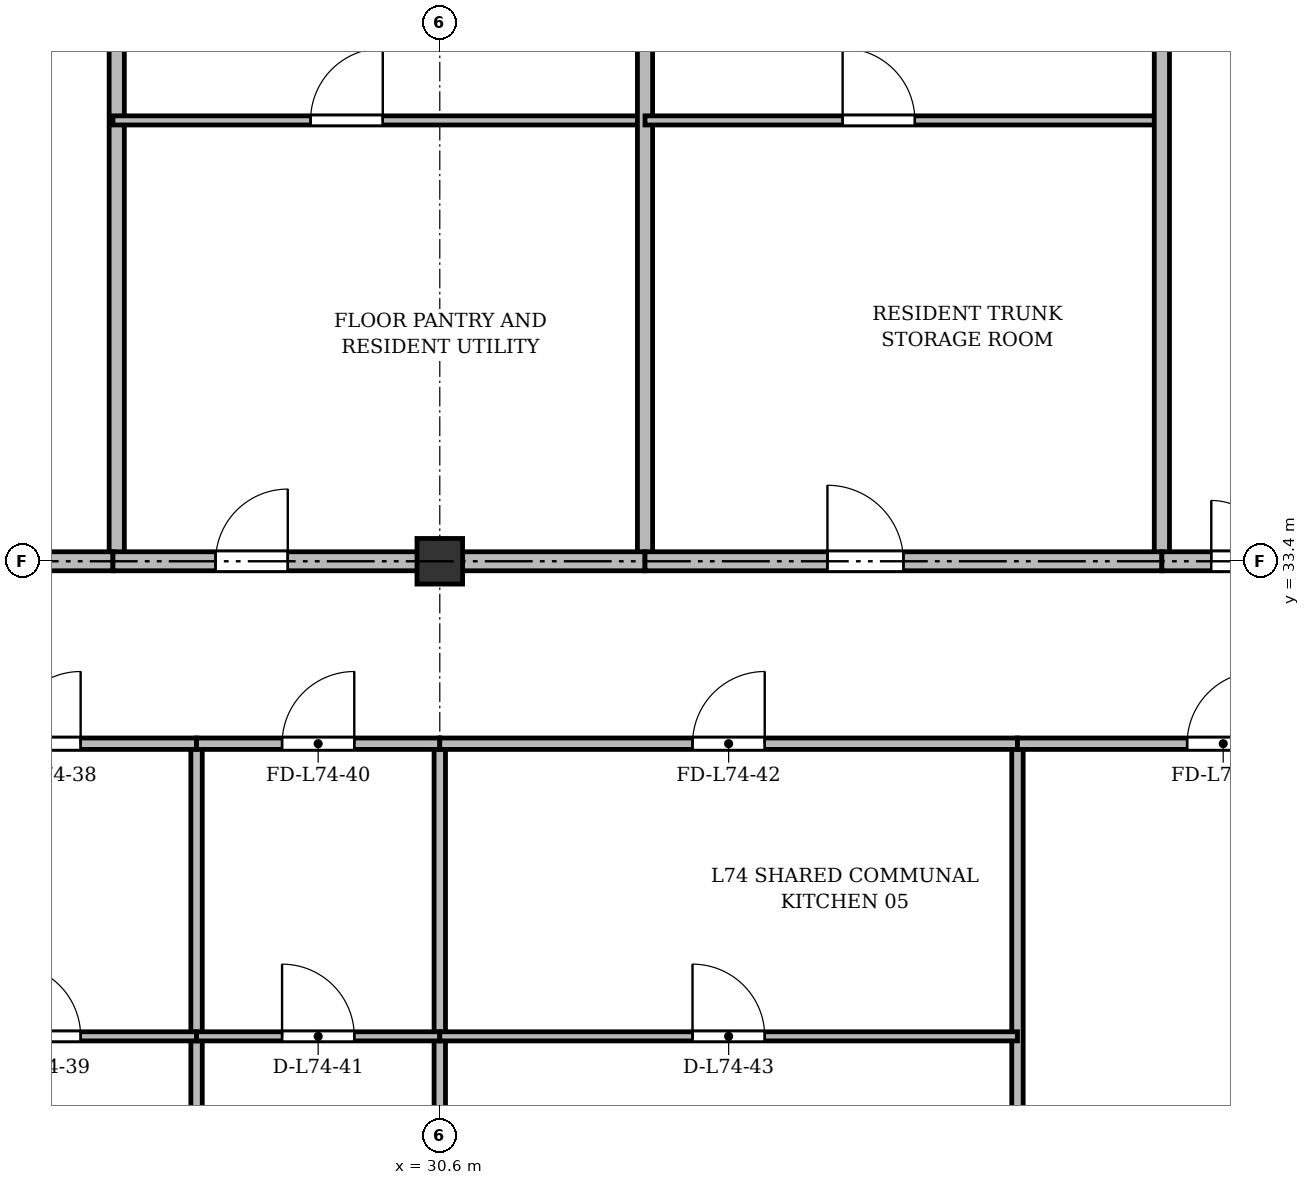
"""IFC4 building model, lengths in metres.
Left out: names, types, materials, properties, quantities, classifications, styles, units other than length and angle.
Written with IfcOpenShell. Run it as: python <this file> out.ifc"""

import sys

from ifc_helpers import new_model, si_unit, direction, frame, frame_2d, origin, origin_2d, place, context, subcontext, project, spatial, rectangle, extrude, source, transform, mapped, element, fill, save


model = new_model("IFC4")
c1 = context("Model", 3, precision=1e-05, world=origin(), true_north=direction((0.0, 1.0)))
c2 = subcontext(c1, "Body", "Model", "MODEL_VIEW")
j1 = project(units=[si_unit("LENGTHUNIT", "METRE"), si_unit("PLANEANGLEUNIT", "RADIAN")], contexts=[c1])
p1 = place(None, origin())
s1 = spatial("IfcSite", under=j1, at=p1, CompositionType="ELEMENT")
p2 = place(p1, origin())
s2 = spatial("IfcBuilding", under=s1, at=p2, CompositionType="ELEMENT")
p3 = place(p2, frame((0.0, 0.0, 284.7)))
s3 = spatial("IfcBuildingStorey", under=s2, at=p3, CompositionType="ELEMENT", Elevation=284.7)
m1 = source(origin(), c2, "Body", "SweptSolid", [
    extrude(rectangle(XDim=0.6, YDim=0.6, at=origin_2d()), origin(), (0.0, 0.0, 1.0), 3.6),
])
p4 = place(p3, frame((30.6, 33.4, 0.0), z_axis=(0.0, 0.0, 1.0), x_axis=(1.0, 0.0, 0.0)))
e1 = element("IfcColumn", 1, at=p4, inside=s3, PredefinedType="COLUMN", context=c2, shape_type="MappedRepresentation", body=[
    mapped(m1, transform((0.0, 0.0, 0.0), x_axis=(1.0, 0.0, 0.0), y_axis=(0.0, 1.0, 0.0), z_axis=(0.0, 0.0, 1.0), scale=1.0)),
])
p5 = place(p3, frame((26.35, 33.4, 0.0), z_axis=(0.0, 0.0, 1.0), x_axis=(0.0, 1.0, 0.0)))
e2 = element("IfcWall", 2, at=p5, inside=s3, PredefinedType="SOLIDWALL", context=c2, shape_type="SweptSolid", body=[
    extrude(rectangle(XDim=11.3, YDim=0.2, at=frame_2d((5.65, 0.0))), origin(), (0.0, 0.0, 1.0), 2.92),
])
p6 = place(p3, frame((19.5, 33.4, 0.0), z_axis=(0.0, 0.0, 1.0), x_axis=(1.0, 0.0, 0.0)))
e3 = element("IfcWall", 3, at=p6, inside=s3, PredefinedType="PARTITIONING", context=c2, shape_type="SweptSolid", body=[
    extrude(rectangle(XDim=6.8, YDim=0.25, at=frame_2d((3.4, 0.0))), origin(), (0.0, 0.0, 1.0), 2.92),
])
p7 = place(p6, frame((0.75, 0.0, 0.0)))
e4 = element("IfcOpeningElement", 4, at=p7, cuts=e3, PredefinedType="OPENING", context=c2, shape_type="SweptSolid", body=[
    extrude(rectangle(XDim=1.6, YDim=2.2, at=frame_2d((0.8, 1.1))), frame((0.0, 0.135, 0.0), z_axis=(0.0, -1.0, 0.0), x_axis=(1.0, 0.0, 0.0)), (0.0, 0.0, 1.0), 0.27),
])
p8 = place(p3, frame((26.3, 39.2, 0.0), z_axis=(0.0, 0.0, 1.0), x_axis=(1.0, 0.0, 0.0)))
e5 = element("IfcWall", 5, at=p8, inside=s3, PredefinedType="PARTITIONING", context=c2, shape_type="SweptSolid", body=[
    extrude(rectangle(XDim=7.0, YDim=0.12, at=frame_2d((3.5, 0.0))), origin(), (0.0, 0.0, 1.0), 2.87),
])
p9 = place(p8, frame((2.6, 0.0, 0.0)))
e6 = element("IfcOpeningElement", 6, at=p9, cuts=e5, PredefinedType="OPENING", context=c2, shape_type="SweptSolid", body=[
    extrude(rectangle(XDim=0.95, YDim=2.15, at=frame_2d((0.475, 1.075))), frame((0.0, 0.07, 0.0), z_axis=(0.0, -1.0, 0.0), x_axis=(1.0, 0.0, 0.0)), (0.0, 0.0, 1.0), 0.14),
])
p10 = place(p3, frame((33.3, 33.4, 0.0), z_axis=(0.0, 0.0, 1.0), x_axis=(0.0, 1.0, 0.0)))
e7 = element("IfcWall", 7, at=p10, inside=s3, PredefinedType="SOLIDWALL", context=c2, shape_type="SweptSolid", body=[
    extrude(rectangle(XDim=11.3, YDim=0.2, at=frame_2d((5.65, 0.0))), origin(), (0.0, 0.0, 1.0), 2.92),
])
p11 = place(p3, frame((33.3, 39.2, 0.0), z_axis=(0.0, 0.0, 1.0), x_axis=(1.0, 0.0, 0.0)))
e8 = element("IfcWall", 8, at=p11, inside=s3, PredefinedType="PARTITIONING", context=c2, shape_type="SweptSolid", body=[
    extrude(rectangle(XDim=6.8, YDim=0.12, at=frame_2d((3.4, 0.0))), origin(), (0.0, 0.0, 1.0), 3.37),
])
p12 = place(p11, frame((2.6, 0.0, 0.0)))
e9 = element("IfcOpeningElement", 9, at=p12, cuts=e8, PredefinedType="OPENING", context=c2, shape_type="SweptSolid", body=[
    extrude(rectangle(XDim=0.95, YDim=2.15, at=frame_2d((0.475, 1.075))), frame((0.0, 0.07, 0.0), z_axis=(0.0, -1.0, 0.0), x_axis=(1.0, 0.0, 0.0)), (0.0, 0.0, 1.0), 0.14),
])
p13 = place(p3, frame((40.1, 33.4, 0.0), z_axis=(0.0, 0.0, 1.0), x_axis=(0.0, 1.0, 0.0)))
e10 = element("IfcWall", 10, at=p13, inside=s3, PredefinedType="SOLIDWALL", context=c2, shape_type="SweptSolid", body=[
    extrude(rectangle(XDim=8.0, YDim=0.2, at=frame_2d((4.0, 0.0))), origin(), (0.0, 0.0, 1.0), 2.92),
])
p14 = place(p3, frame((26.3, 33.4, 0.0), z_axis=(0.0, 0.0, 1.0), x_axis=(1.0, 0.0, 0.0)))
e11 = element("IfcWall", 11, at=p14, inside=s3, PredefinedType="PARTITIONING", context=c2, shape_type="SweptSolid", body=[
    extrude(rectangle(XDim=7.0, YDim=0.25, at=frame_2d((3.5, 0.0))), origin(), (0.0, 0.0, 1.0), 2.92),
])
p15 = place(p14, frame((1.35, 0.0, 0.0)))
e12 = element("IfcOpeningElement", 12, at=p15, cuts=e11, PredefinedType="OPENING", context=c2, shape_type="SweptSolid", body=[
    extrude(rectangle(XDim=0.95, YDim=2.15, at=frame_2d((0.475, 1.075))), frame((0.0, 0.135, 0.0), z_axis=(0.0, -1.0, 0.0), x_axis=(1.0, 0.0, 0.0)), (0.0, 0.0, 1.0), 0.27),
])
p16 = place(p3, frame((33.3, 33.4, 0.0), z_axis=(0.0, 0.0, 1.0), x_axis=(1.0, 0.0, 0.0)))
e13 = element("IfcWall", 13, at=p16, inside=s3, PredefinedType="PARTITIONING", context=c2, shape_type="SweptSolid", body=[
    extrude(rectangle(XDim=6.8, YDim=0.25, at=frame_2d((3.4, 0.0))), origin(), (0.0, 0.0, 1.0), 2.92),
])
p17 = place(p16, frame((2.4, 0.0, 0.0)))
e14 = element("IfcOpeningElement", 14, at=p17, cuts=e13, PredefinedType="OPENING", context=c2, shape_type="SweptSolid", body=[
    extrude(rectangle(XDim=1.0, YDim=2.15, at=frame_2d((0.5, 1.075))), frame((0.0, 0.135, 0.0), z_axis=(0.0, -1.0, 0.0), x_axis=(1.0, 0.0, 0.0)), (0.0, 0.0, 1.0), 0.27),
])
p18 = place(p3, frame((40.1, 33.4, 0.0), z_axis=(0.0, 0.0, 1.0), x_axis=(1.0, 0.0, 0.0)))
e15 = element("IfcWall", 15, at=p18, inside=s3, PredefinedType="PARTITIONING", context=c2, shape_type="SweptSolid", body=[
    extrude(rectangle(XDim=7.05, YDim=0.25, at=frame_2d((3.525, 0.0))), origin(), (0.0, 0.0, 1.0), 2.92),
])
p19 = place(p18, frame((0.65, 0.0, 0.0)))
e16 = element("IfcOpeningElement", 16, at=p19, cuts=e15, PredefinedType="OPENING", context=c2, shape_type="SweptSolid", body=[
    extrude(rectangle(XDim=1.6, YDim=2.2, at=frame_2d((0.8, 1.1))), frame((0.0, 0.135, 0.0), z_axis=(0.0, -1.0, 0.0), x_axis=(1.0, 0.0, 0.0)), (0.0, 0.0, 1.0), 0.27),
])
p20 = place(p3, frame((27.4, 3.725, 0.0), z_axis=(0.0, 0.0, 1.0), x_axis=(0.0, 1.0, 0.0)))
e17 = element("IfcWall", 17, at=p20, inside=s3, PredefinedType="PARTITIONING", context=c2, shape_type="SweptSolid", body=[
    extrude(rectangle(XDim=27.275, YDim=0.15, at=frame_2d((13.637, 0.0))), origin(), (0.0, 0.0, 1.0), 2.92),
])
p21 = place(p3, frame((30.6, 3.725, 0.0), z_axis=(0.0, 0.0, 1.0), x_axis=(0.0, 1.0, 0.0)))
e18 = element("IfcWall", 18, at=p21, inside=s3, PredefinedType="PARTITIONING", context=c2, shape_type="SweptSolid", body=[
    extrude(rectangle(XDim=27.275, YDim=0.15, at=frame_2d((13.637, 0.0))), origin(), (0.0, 0.0, 1.0), 2.87),
])
p22 = place(p3, frame((38.2, 3.725, 0.0), z_axis=(0.0, 0.0, 1.0), x_axis=(0.0, 1.0, 0.0)))
e19 = element("IfcWall", 19, at=p22, inside=s3, PredefinedType="PARTITIONING", context=c2, shape_type="SweptSolid", body=[
    extrude(rectangle(XDim=27.275, YDim=0.15, at=frame_2d((13.637, 0.0))), origin(), (0.0, 0.0, 1.0), 2.92),
])
p23 = place(p3, frame((23.4, 31.0, 0.0), z_axis=(0.0, 0.0, 1.0), x_axis=(1.0, 0.0, 0.0)))
e20 = element("IfcWall", 20, at=p23, inside=s3, PredefinedType="PARTITIONING", context=c2, shape_type="SweptSolid", body=[
    extrude(rectangle(XDim=4.0, YDim=0.15, at=frame_2d((2.0, 0.0))), origin(), (0.0, 0.0, 1.0), 2.87),
])
p24 = place(p23, frame((1.525, 0.0, 0.0)))
e21 = element("IfcOpeningElement", 21, at=p24, cuts=e20, PredefinedType="OPENING", context=c2, shape_type="SweptSolid", body=[
    extrude(rectangle(XDim=0.95, YDim=2.15, at=frame_2d((0.475, 1.075))), frame((0.0, 0.085, 0.0), z_axis=(0.0, -1.0, 0.0), x_axis=(1.0, 0.0, 0.0)), (0.0, 0.0, 1.0), 0.17),
])
p25 = place(p3, frame((23.4, 27.15, 0.0), z_axis=(0.0, 0.0, 1.0), x_axis=(1.0, 0.0, 0.0)))
e22 = element("IfcWall", 22, at=p25, inside=s3, PredefinedType="PARTITIONING", context=c2, shape_type="SweptSolid", body=[
    extrude(rectangle(XDim=4.0, YDim=0.12, at=frame_2d((2.0, 0.0))), origin(), (0.0, 0.0, 1.0), 2.87),
])
p26 = place(p25, frame((1.525, 0.0, 0.0)))
e23 = element("IfcOpeningElement", 23, at=p26, cuts=e22, PredefinedType="OPENING", context=c2, shape_type="SweptSolid", body=[
    extrude(rectangle(XDim=0.95, YDim=2.15, at=frame_2d((0.475, 1.075))), frame((0.0, 0.07, 0.0), z_axis=(0.0, -1.0, 0.0), x_axis=(1.0, 0.0, 0.0)), (0.0, 0.0, 1.0), 0.14),
])
p27 = place(p3, frame((27.4, 31.0, 0.0), z_axis=(0.0, 0.0, 1.0), x_axis=(1.0, 0.0, 0.0)))
e24 = element("IfcWall", 24, at=p27, inside=s3, PredefinedType="PARTITIONING", context=c2, shape_type="SweptSolid", body=[
    extrude(rectangle(XDim=3.2, YDim=0.15, at=frame_2d((1.6, 0.0))), origin(), (0.0, 0.0, 1.0), 2.87),
])
p28 = place(p27, frame((1.125, 0.0, 0.0)))
e25 = element("IfcOpeningElement", 25, at=p28, cuts=e24, PredefinedType="OPENING", context=c2, shape_type="SweptSolid", body=[
    extrude(rectangle(XDim=0.95, YDim=2.15, at=frame_2d((0.475, 1.075))), frame((0.0, 0.085, 0.0), z_axis=(0.0, -1.0, 0.0), x_axis=(1.0, 0.0, 0.0)), (0.0, 0.0, 1.0), 0.17),
])
p29 = place(p3, frame((27.4, 27.15, 0.0), z_axis=(0.0, 0.0, 1.0), x_axis=(1.0, 0.0, 0.0)))
e26 = element("IfcWall", 26, at=p29, inside=s3, PredefinedType="PARTITIONING", context=c2, shape_type="SweptSolid", body=[
    extrude(rectangle(XDim=3.2, YDim=0.12, at=frame_2d((1.6, 0.0))), origin(), (0.0, 0.0, 1.0), 2.87),
])
p30 = place(p29, frame((1.125, 0.0, 0.0)))
e27 = element("IfcOpeningElement", 27, at=p30, cuts=e26, PredefinedType="OPENING", context=c2, shape_type="SweptSolid", body=[
    extrude(rectangle(XDim=0.95, YDim=2.15, at=frame_2d((0.475, 1.075))), frame((0.0, 0.07, 0.0), z_axis=(0.0, -1.0, 0.0), x_axis=(1.0, 0.0, 0.0)), (0.0, 0.0, 1.0), 0.14),
])
p31 = place(p3, frame((30.6, 31.0, 0.0), z_axis=(0.0, 0.0, 1.0), x_axis=(1.0, 0.0, 0.0)))
e28 = element("IfcWall", 28, at=p31, inside=s3, PredefinedType="PARTITIONING", context=c2, shape_type="SweptSolid", body=[
    extrude(rectangle(XDim=7.6, YDim=0.15, at=frame_2d((3.8, 0.0))), origin(), (0.0, 0.0, 1.0), 2.87),
])
p32 = place(p31, frame((3.325, 0.0, 0.0)))
e29 = element("IfcOpeningElement", 29, at=p32, cuts=e28, PredefinedType="OPENING", context=c2, shape_type="SweptSolid", body=[
    extrude(rectangle(XDim=0.95, YDim=2.15, at=frame_2d((0.475, 1.075))), frame((0.0, 0.085, 0.0), z_axis=(0.0, -1.0, 0.0), x_axis=(1.0, 0.0, 0.0)), (0.0, 0.0, 1.0), 0.17),
])
p33 = place(p3, frame((30.6, 27.15, 0.0), z_axis=(0.0, 0.0, 1.0), x_axis=(1.0, 0.0, 0.0)))
e30 = element("IfcWall", 30, at=p33, inside=s3, PredefinedType="PARTITIONING", context=c2, shape_type="SweptSolid", body=[
    extrude(rectangle(XDim=7.6, YDim=0.12, at=frame_2d((3.8, 0.0))), origin(), (0.0, 0.0, 1.0), 2.87),
])
p34 = place(p33, frame((3.325, 0.0, 0.0)))
e31 = element("IfcOpeningElement", 31, at=p34, cuts=e30, PredefinedType="OPENING", context=c2, shape_type="SweptSolid", body=[
    extrude(rectangle(XDim=0.95, YDim=2.15, at=frame_2d((0.475, 1.075))), frame((0.0, 0.07, 0.0), z_axis=(0.0, -1.0, 0.0), x_axis=(1.0, 0.0, 0.0)), (0.0, 0.0, 1.0), 0.14),
])
p35 = place(p3, frame((38.2, 31.0, 0.0), z_axis=(0.0, 0.0, 1.0), x_axis=(1.0, 0.0, 0.0)))
e32 = element("IfcWall", 32, at=p35, inside=s3, PredefinedType="PARTITIONING", context=c2, shape_type="SweptSolid", body=[
    extrude(rectangle(XDim=5.6, YDim=0.15, at=frame_2d((2.8, 0.0))), origin(), (0.0, 0.0, 1.0), 2.87),
])
p36 = place(p35, frame((2.232, 0.0, 0.0)))
e33 = element("IfcOpeningElement", 33, at=p36, cuts=e32, PredefinedType="OPENING", context=c2, shape_type="SweptSolid", body=[
    extrude(rectangle(XDim=0.95, YDim=2.15, at=frame_2d((0.475, 1.075))), frame((0.0, 0.085, 0.0), z_axis=(0.0, -1.0, 0.0), x_axis=(1.0, 0.0, 0.0)), (0.0, 0.0, 1.0), 0.17),
])
m2 = source(origin(), c2, "Body", "SweptSolid", [
    extrude(rectangle(XDim=0.95, YDim=2.15, at=frame_2d((0.475, 1.075))), frame((0.0, 0.025, 0.0), z_axis=(0.0, -1.0, 0.0), x_axis=(1.0, 0.0, 0.0)), (0.0, 0.0, 1.0), 0.05),
])
p37 = place(p9, origin())
e34 = element("IfcDoor", 34, at=p37, inside=s3, OperationType="SINGLE_SWING_RIGHT", PredefinedType="DOOR", context=c2, shape_type="MappedRepresentation", body=[
    mapped(m2, transform((0.0, 0.0, 0.0), x_axis=(1.0, 0.0, 0.0), y_axis=(0.0, 1.0, 0.0), z_axis=(0.0, 0.0, 1.0), scale=1.0)),
])
fill(e6, e34)
p38 = place(p12, origin())
e35 = element("IfcDoor", 35, at=p38, inside=s3, OperationType="SINGLE_SWING_LEFT", PredefinedType="DOOR", context=c2, shape_type="MappedRepresentation", body=[
    mapped(m2, transform((0.0, 0.0, 0.0), x_axis=(1.0, 0.0, 0.0), y_axis=(0.0, 1.0, 0.0), z_axis=(0.0, 0.0, 1.0), scale=1.0)),
])
fill(e9, e35)
p39 = place(p15, origin())
e36 = element("IfcDoor", 36, at=p39, inside=s3, OperationType="SINGLE_SWING_RIGHT", PredefinedType="DOOR", context=c2, shape_type="MappedRepresentation", body=[
    mapped(m2, transform((0.0, 0.0, 0.0), x_axis=(1.0, 0.0, 0.0), y_axis=(0.0, 1.0, 0.0), z_axis=(0.0, 0.0, 1.0), scale=1.0)),
])
fill(e12, e36)
m3 = source(origin(), c2, "Body", "SweptSolid", [
    extrude(rectangle(XDim=1.0, YDim=2.15, at=frame_2d((0.5, 1.075))), frame((0.0, 0.025, 0.0), z_axis=(0.0, -1.0, 0.0), x_axis=(1.0, 0.0, 0.0)), (0.0, 0.0, 1.0), 0.05),
])
p40 = place(p17, origin())
e37 = element("IfcDoor", 37, at=p40, inside=s3, OperationType="SINGLE_SWING_LEFT", PredefinedType="DOOR", context=c2, shape_type="MappedRepresentation", body=[
    mapped(m3, transform((0.0, 0.0, 0.0), x_axis=(1.0, 0.0, 0.0), y_axis=(0.0, 1.0, 0.0), z_axis=(0.0, 0.0, 1.0), scale=1.0)),
])
fill(e14, e37)
m4 = source(origin(), c2, "Body", "SweptSolid", [
    extrude(rectangle(XDim=1.6, YDim=2.2, at=frame_2d((0.8, 1.1))), frame((0.0, 0.025, 0.0), z_axis=(0.0, -1.0, 0.0), x_axis=(1.0, 0.0, 0.0)), (0.0, 0.0, 1.0), 0.05),
])
p41 = place(p19, origin())
e38 = element("IfcDoor", 38, at=p41, inside=s3, OperationType="DOUBLE_DOOR_SINGLE_SWING", PredefinedType="DOOR", context=c2, shape_type="MappedRepresentation", body=[
    mapped(m4, transform((0.0, 0.0, 0.0), x_axis=(1.0, 0.0, 0.0), y_axis=(0.0, 1.0, 0.0), z_axis=(0.0, 0.0, 1.0), scale=1.0)),
])
fill(e16, e38)
p42 = place(p24, origin())
e39 = element("IfcDoor", 39, at=p42, inside=s3, OperationType="SINGLE_SWING_RIGHT", PredefinedType="DOOR", context=c2, shape_type="MappedRepresentation", body=[
    mapped(m2, transform((0.0, 0.0, 0.0), x_axis=(1.0, 0.0, 0.0), y_axis=(0.0, 1.0, 0.0), z_axis=(0.0, 0.0, 1.0), scale=1.0)),
])
fill(e21, e39)
p43 = place(p26, origin())
e40 = element("IfcDoor", 40, at=p43, inside=s3, OperationType="SINGLE_SWING_LEFT", PredefinedType="DOOR", context=c2, shape_type="MappedRepresentation", body=[
    mapped(m2, transform((0.0, 0.0, 0.0), x_axis=(1.0, 0.0, 0.0), y_axis=(0.0, 1.0, 0.0), z_axis=(0.0, 0.0, 1.0), scale=1.0)),
])
fill(e23, e40)
p44 = place(p28, origin())
e41 = element("IfcDoor", 41, at=p44, inside=s3, OperationType="SINGLE_SWING_RIGHT", PredefinedType="DOOR", context=c2, shape_type="MappedRepresentation", body=[
    mapped(m2, transform((0.0, 0.0, 0.0), x_axis=(1.0, 0.0, 0.0), y_axis=(0.0, 1.0, 0.0), z_axis=(0.0, 0.0, 1.0), scale=1.0)),
])
fill(e25, e41)
p45 = place(p30, origin())
e42 = element("IfcDoor", 42, at=p45, inside=s3, OperationType="SINGLE_SWING_LEFT", PredefinedType="DOOR", context=c2, shape_type="MappedRepresentation", body=[
    mapped(m2, transform((0.0, 0.0, 0.0), x_axis=(1.0, 0.0, 0.0), y_axis=(0.0, 1.0, 0.0), z_axis=(0.0, 0.0, 1.0), scale=1.0)),
])
fill(e27, e42)
p46 = place(p32, origin())
e43 = element("IfcDoor", 43, at=p46, inside=s3, OperationType="SINGLE_SWING_RIGHT", PredefinedType="DOOR", context=c2, shape_type="MappedRepresentation", body=[
    mapped(m2, transform((0.0, 0.0, 0.0), x_axis=(1.0, 0.0, 0.0), y_axis=(0.0, 1.0, 0.0), z_axis=(0.0, 0.0, 1.0), scale=1.0)),
])
fill(e29, e43)
p47 = place(p34, origin())
e44 = element("IfcDoor", 44, at=p47, inside=s3, OperationType="SINGLE_SWING_LEFT", PredefinedType="DOOR", context=c2, shape_type="MappedRepresentation", body=[
    mapped(m2, transform((0.0, 0.0, 0.0), x_axis=(1.0, 0.0, 0.0), y_axis=(0.0, 1.0, 0.0), z_axis=(0.0, 0.0, 1.0), scale=1.0)),
])
fill(e31, e44)
p48 = place(p36, origin())
e45 = element("IfcDoor", 45, at=p48, inside=s3, OperationType="SINGLE_SWING_RIGHT", PredefinedType="DOOR", context=c2, shape_type="MappedRepresentation", body=[
    mapped(m2, transform((0.0, 0.0, 0.0), x_axis=(1.0, 0.0, 0.0), y_axis=(0.0, 1.0, 0.0), z_axis=(0.0, 0.0, 1.0), scale=1.0)),
])
fill(e33, e45)
save(model, sys.argv[1])
